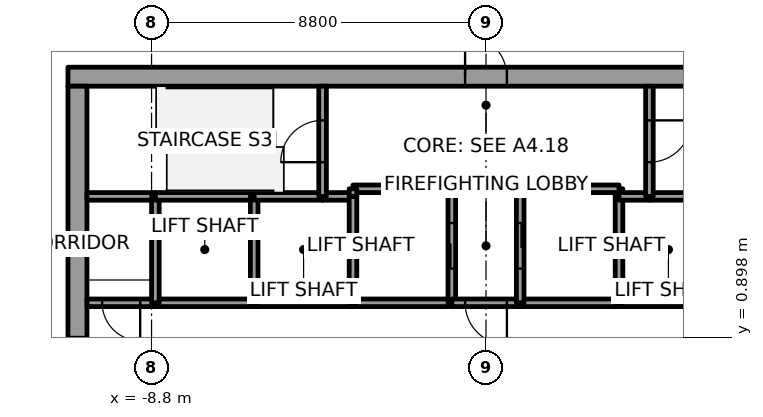
"""IFC4 building model, lengths in metres.
Left out: names, types, materials, properties, quantities, classifications, styles, units other than length and angle.
Written with IfcOpenShell. Run it as: python <this file> out.ifc"""

import sys

from ifc_helpers import new_model, si_unit, direction, frame, frame_2d, origin, place, context, subcontext, project, spatial, rectangle, extrude, element, fill, save


model = new_model("IFC4")
c1 = context("Model", 3, precision=1e-05, world=origin(), true_north=direction((0.0, 1.0)))
c2 = subcontext(c1, "Body", "Model", "MODEL_VIEW")
j1 = project(units=[si_unit("LENGTHUNIT", "METRE"), si_unit("PLANEANGLEUNIT", "RADIAN")], contexts=[c1])
p1 = place(None, origin())
s1 = spatial("IfcSite", under=j1, at=p1, CompositionType="ELEMENT")
p2 = place(p1, origin())
s2 = spatial("IfcBuilding", under=s1, at=p2, CompositionType="ELEMENT")
p3 = place(p2, frame((0.0, 0.0, 81.3)))
s3 = spatial("IfcBuildingStorey", under=s2, at=p3, CompositionType="ELEMENT", Elevation=81.3)
p4 = place(p3, frame((-11.0, 7.75, 0.0), z_axis=(0.0, 0.0, 1.0), x_axis=(1.0, 0.0, 0.0)))
e1 = element("IfcWall", 1, at=p4, inside=s3, PredefinedType="SHEAR", context=c2, shape_type="SweptSolid", body=[
    extrude(rectangle(XDim=22.0, YDim=0.5, at=frame_2d((11.0, 0.0))), origin(), (0.0, 0.0, 1.0), 3.7),
])
p5 = place(p4, frame((10.45, 0.0, 0.0)))
e2 = element("IfcOpeningElement", 2, at=p5, cuts=e1, PredefinedType="OPENING", context=c2, shape_type="SweptSolid", body=[
    extrude(rectangle(XDim=1.1, YDim=2.1, at=frame_2d((0.55, 1.05))), frame((0.0, 0.25, 0.0), z_axis=(0.0, -1.0, 0.0), x_axis=(1.0, 0.0, 0.0)), (0.0, 0.0, 1.0), 0.5),
])
p6 = place(p3, frame((-10.75, -7.5, 0.0), z_axis=(0.0, 0.0, 1.0), x_axis=(0.0, 1.0, 0.0)))
e3 = element("IfcWall", 3, at=p6, inside=s3, PredefinedType="SHEAR", context=c2, shape_type="SweptSolid", body=[
    extrude(rectangle(XDim=15.0, YDim=0.5, at=frame_2d((7.5, 0.0))), origin(), (0.0, 0.0, 1.0), 3.7),
])
p7 = place(p6, frame((6.6, 0.0, 0.0)))
e4 = element("IfcOpeningElement", 4, at=p7, cuts=e3, PredefinedType="OPENING", context=c2, shape_type="SweptSolid", body=[
    extrude(rectangle(XDim=1.8, YDim=2.1, at=frame_2d((0.9, 1.05))), frame((0.0, 0.25, 0.0), z_axis=(0.0, -1.0, 0.0), x_axis=(1.0, 0.0, 0.0)), (0.0, 0.0, 1.0), 0.5),
])
p8 = place(p3, frame((-8.7, 1.8, 0.0), z_axis=(0.0, 0.0, 1.0), x_axis=(-1.0, 0.0, 0.0)))
e5 = element("IfcWall", 5, at=p8, inside=s3, PredefinedType="SOLIDWALL", context=c2, shape_type="SweptSolid", body=[
    extrude(rectangle(XDim=1.8, YDim=0.2, at=frame_2d((0.9, 0.0))), origin(), (0.0, 0.0, 1.0), 3.55),
])
p9 = place(p8, frame((0.4, 0.0, 0.0)))
e6 = element("IfcOpeningElement", 6, at=p9, cuts=e5, PredefinedType="OPENING", context=c2, shape_type="SweptSolid", body=[
    extrude(rectangle(XDim=1.0, YDim=2.1, at=frame_2d((0.5, 1.05))), frame((0.0, 0.1, 0.0), z_axis=(0.0, -1.0, 0.0), x_axis=(1.0, 0.0, 0.0)), (0.0, 0.0, 1.0), 0.2),
])
p10 = place(p3, frame((-8.7, 4.6, 0.0), z_axis=(0.0, 0.0, 1.0), x_axis=(-1.0, 0.0, 0.0)))
e7 = element("IfcWall", 7, at=p10, inside=s3, PredefinedType="SOLIDWALL", context=c2, shape_type="SweptSolid", body=[
    extrude(rectangle(XDim=1.8, YDim=0.2, at=frame_2d((0.9, 0.0))), origin(), (0.0, 0.0, 1.0), 3.55),
])
p11 = place(p3, frame((-6.1, 1.8, 0.0), z_axis=(0.0, 0.0, 1.0), x_axis=(-1.0, 0.0, 0.0)))
e8 = element("IfcWall", 8, at=p11, inside=s3, PredefinedType="SOLIDWALL", context=c2, shape_type="SweptSolid", body=[
    extrude(rectangle(XDim=2.6, YDim=0.2, at=frame_2d((1.3, 0.0))), origin(), (0.0, 0.0, 1.0), 3.55),
])
p12 = place(p3, frame((-8.7, 1.8, 0.0), z_axis=(0.0, 0.0, 1.0), x_axis=(0.0, 1.0, 0.0)))
e9 = element("IfcWall", 9, at=p12, inside=s3, PredefinedType="SOLIDWALL", context=c2, shape_type="SweptSolid", body=[
    extrude(rectangle(XDim=2.8, YDim=0.2, at=frame_2d((1.4, 0.0))), origin(), (0.0, 0.0, 1.0), 3.55),
])
p13 = place(p3, frame((-6.1, 4.6, 0.0), z_axis=(0.0, 0.0, 1.0), x_axis=(-1.0, 0.0, 0.0)))
e10 = element("IfcWall", 10, at=p13, inside=s3, PredefinedType="SOLIDWALL", context=c2, shape_type="SweptSolid", body=[
    extrude(rectangle(XDim=2.6, YDim=0.2, at=frame_2d((1.3, 0.0))), origin(), (0.0, 0.0, 1.0), 3.55),
])
p14 = place(p3, frame((-3.5, 1.8, 0.0), z_axis=(0.0, 0.0, 1.0), x_axis=(-1.0, 0.0, 0.0)))
e11 = element("IfcWall", 11, at=p14, inside=s3, PredefinedType="SOLIDWALL", context=c2, shape_type="SweptSolid", body=[
    extrude(rectangle(XDim=2.6, YDim=0.2, at=frame_2d((1.3, 0.0))), origin(), (0.0, 0.0, 1.0), 3.55),
])
p15 = place(p3, frame((-6.1, 1.8, 0.0), z_axis=(0.0, 0.0, 1.0), x_axis=(0.0, 1.0, 0.0)))
e12 = element("IfcWall", 12, at=p15, inside=s3, PredefinedType="SOLIDWALL", context=c2, shape_type="SweptSolid", body=[
    extrude(rectangle(XDim=2.8, YDim=0.2, at=frame_2d((1.4, 0.0))), origin(), (0.0, 0.0, 1.0), 3.55),
])
p16 = place(p3, frame((-4.3, 4.6, 0.0), z_axis=(0.0, 0.0, 1.0), x_axis=(-1.0, 0.0, 0.0)))
e13 = element("IfcWall", 13, at=p16, inside=s3, PredefinedType="SOLIDWALL", context=c2, shape_type="SweptSolid", body=[
    extrude(rectangle(XDim=1.8, YDim=0.2, at=frame_2d((0.9, 0.0))), origin(), (0.0, 0.0, 1.0), 3.55),
])
p17 = place(p3, frame((-3.5, 4.6, 0.0), z_axis=(0.0, 0.0, 1.0), x_axis=(-1.0, 0.0, 0.0)))
e14 = element("IfcWall", 14, at=p17, inside=s3, PredefinedType="SOLIDWALL", context=c2, shape_type="SweptSolid", body=[
    extrude(rectangle(XDim=0.8, YDim=0.2, at=frame_2d((0.4, 0.0))), origin(), (0.0, 0.0, 1.0), 3.55),
])
p18 = place(p3, frame((-4.3, 4.6, 0.0), z_axis=(0.0, 0.0, 1.0), x_axis=(0.0, 1.0, 0.0)))
e15 = element("IfcWall", 15, at=p18, inside=s3, PredefinedType="SOLIDWALL", context=c2, shape_type="SweptSolid", body=[
    extrude(rectangle(XDim=2.9, YDim=0.2, at=frame_2d((1.45, 0.0))), origin(), (0.0, 0.0, 1.0), 3.55),
])
p19 = place(p18, frame((0.9, 0.0, 0.0)))
e16 = element("IfcOpeningElement", 16, at=p19, cuts=e15, PredefinedType="OPENING", context=c2, shape_type="SweptSolid", body=[
    extrude(rectangle(XDim=1.1, YDim=2.1, at=frame_2d((0.55, 1.05))), frame((0.0, 0.1, 0.0), z_axis=(0.0, -1.0, 0.0), x_axis=(1.0, 0.0, 0.0)), (0.0, 0.0, 1.0), 0.2),
])
p20 = place(p3, frame((-0.9, 1.8, 0.0), z_axis=(0.0, 0.0, 1.0), x_axis=(-1.0, 0.0, 0.0)))
e17 = element("IfcWall", 17, at=p20, inside=s3, PredefinedType="SOLIDWALL", context=c2, shape_type="SweptSolid", body=[
    extrude(rectangle(XDim=2.6, YDim=0.2, at=frame_2d((1.3, 0.0))), origin(), (0.0, 0.0, 1.0), 3.55),
])
p21 = place(p3, frame((-3.5, 4.6, 0.0), z_axis=(0.0, 0.0, 1.0), x_axis=(0.0, -1.0, 0.0)))
e18 = element("IfcWall", 18, at=p21, inside=s3, PredefinedType="SOLIDWALL", context=c2, shape_type="SweptSolid", body=[
    extrude(rectangle(XDim=2.8, YDim=0.2, at=frame_2d((1.4, 0.0))), origin(), (0.0, 0.0, 1.0), 3.55),
])
p22 = place(p3, frame((-0.9, 1.8, 0.0), z_axis=(0.0, 0.0, 1.0), x_axis=(0.0, 1.0, 0.0)))
e19 = element("IfcWall", 19, at=p22, inside=s3, PredefinedType="SOLIDWALL", context=c2, shape_type="SweptSolid", body=[
    extrude(rectangle(XDim=3.0, YDim=0.2, at=frame_2d((1.5, 0.0))), origin(), (0.0, 0.0, 1.0), 3.55),
])
p23 = place(p22, frame((0.9, 0.0, 0.0)))
e20 = element("IfcOpeningElement", 20, at=p23, cuts=e19, PredefinedType="OPENING", context=c2, shape_type="SweptSolid", body=[
    extrude(rectangle(XDim=1.2, YDim=2.1, at=frame_2d((0.6, 1.05))), frame((0.0, 0.1, 0.0), z_axis=(0.0, -1.0, 0.0), x_axis=(1.0, 0.0, 0.0)), (0.0, 0.0, 1.0), 0.2),
])
p24 = place(p3, frame((-0.9, 4.8, 0.0), z_axis=(0.0, 0.0, 1.0), x_axis=(-1.0, 0.0, 0.0)))
e21 = element("IfcWall", 21, at=p24, inside=s3, PredefinedType="SOLIDWALL", context=c2, shape_type="SweptSolid", body=[
    extrude(rectangle(XDim=2.6, YDim=0.2, at=frame_2d((1.3, 0.0))), origin(), (0.0, 0.0, 1.0), 3.55),
])
p25 = place(p3, frame((-3.5, 4.8, 0.0), z_axis=(0.0, 0.0, 1.0), x_axis=(0.0, -1.0, 0.0)))
e22 = element("IfcWall", 22, at=p25, inside=s3, PredefinedType="SOLIDWALL", context=c2, shape_type="SweptSolid", body=[
    extrude(rectangle(XDim=0.2, YDim=0.2, at=frame_2d((0.1, 0.0))), origin(), (0.0, 0.0, 1.0), 3.55),
])
p26 = place(p3, frame((0.9, 1.8, 0.0), z_axis=(0.0, 0.0, 1.0), x_axis=(-1.0, 0.0, 0.0)))
e23 = element("IfcWall", 23, at=p26, inside=s3, PredefinedType="SOLIDWALL", context=c2, shape_type="SweptSolid", body=[
    extrude(rectangle(XDim=1.8, YDim=0.2, at=frame_2d((0.9, 0.0))), origin(), (0.0, 0.0, 1.0), 3.55),
])
p27 = place(p26, frame((0.35, 0.0, 0.0)))
e24 = element("IfcOpeningElement", 24, at=p27, cuts=e23, PredefinedType="OPENING", context=c2, shape_type="SweptSolid", body=[
    extrude(rectangle(XDim=1.1, YDim=2.1, at=frame_2d((0.55, 1.05))), frame((0.0, 0.1, 0.0), z_axis=(0.0, -1.0, 0.0), x_axis=(1.0, 0.0, 0.0)), (0.0, 0.0, 1.0), 0.2),
])
p28 = place(p3, frame((3.5, 1.8, 0.0), z_axis=(0.0, 0.0, 1.0), x_axis=(-1.0, 0.0, 0.0)))
e25 = element("IfcWall", 25, at=p28, inside=s3, PredefinedType="SOLIDWALL", context=c2, shape_type="SweptSolid", body=[
    extrude(rectangle(XDim=2.6, YDim=0.2, at=frame_2d((1.3, 0.0))), origin(), (0.0, 0.0, 1.0), 3.55),
])
p29 = place(p3, frame((3.5, 4.6, 0.0), z_axis=(0.0, 0.0, 1.0), x_axis=(0.0, 1.0, 0.0)))
e26 = element("IfcWall", 26, at=p29, inside=s3, PredefinedType="SOLIDWALL", context=c2, shape_type="SweptSolid", body=[
    extrude(rectangle(XDim=0.2, YDim=0.2, at=frame_2d((0.1, 0.0))), origin(), (0.0, 0.0, 1.0), 3.55),
])
p30 = place(p3, frame((3.5, 4.8, 0.0), z_axis=(0.0, 0.0, 1.0), x_axis=(-1.0, 0.0, 0.0)))
e27 = element("IfcWall", 27, at=p30, inside=s3, PredefinedType="SOLIDWALL", context=c2, shape_type="SweptSolid", body=[
    extrude(rectangle(XDim=2.6, YDim=0.2, at=frame_2d((1.3, 0.0))), origin(), (0.0, 0.0, 1.0), 3.55),
])
p31 = place(p3, frame((0.9, 4.8, 0.0), z_axis=(0.0, 0.0, 1.0), x_axis=(0.0, -1.0, 0.0)))
e28 = element("IfcWall", 28, at=p31, inside=s3, PredefinedType="SOLIDWALL", context=c2, shape_type="SweptSolid", body=[
    extrude(rectangle(XDim=3.0, YDim=0.2, at=frame_2d((1.5, 0.0))), origin(), (0.0, 0.0, 1.0), 3.55),
])
p32 = place(p31, frame((0.9, 0.0, 0.0)))
e29 = element("IfcOpeningElement", 29, at=p32, cuts=e28, PredefinedType="OPENING", context=c2, shape_type="SweptSolid", body=[
    extrude(rectangle(XDim=1.2, YDim=2.1, at=frame_2d((0.6, 1.05))), frame((0.0, 0.1, 0.0), z_axis=(0.0, -1.0, 0.0), x_axis=(1.0, 0.0, 0.0)), (0.0, 0.0, 1.0), 0.2),
])
p33 = place(p3, frame((6.1, 1.8, 0.0), z_axis=(0.0, 0.0, 1.0), x_axis=(-1.0, 0.0, 0.0)))
e30 = element("IfcWall", 30, at=p33, inside=s3, PredefinedType="SOLIDWALL", context=c2, shape_type="SweptSolid", body=[
    extrude(rectangle(XDim=2.6, YDim=0.2, at=frame_2d((1.3, 0.0))), origin(), (0.0, 0.0, 1.0), 3.55),
])
p34 = place(p3, frame((3.5, 1.8, 0.0), z_axis=(0.0, 0.0, 1.0), x_axis=(0.0, 1.0, 0.0)))
e31 = element("IfcWall", 31, at=p34, inside=s3, PredefinedType="SOLIDWALL", context=c2, shape_type="SweptSolid", body=[
    extrude(rectangle(XDim=2.8, YDim=0.2, at=frame_2d((1.4, 0.0))), origin(), (0.0, 0.0, 1.0), 3.55),
])
p35 = place(p3, frame((4.3, 4.6, 0.0), z_axis=(0.0, 0.0, 1.0), x_axis=(-1.0, 0.0, 0.0)))
e32 = element("IfcWall", 32, at=p35, inside=s3, PredefinedType="SOLIDWALL", context=c2, shape_type="SweptSolid", body=[
    extrude(rectangle(XDim=0.8, YDim=0.2, at=frame_2d((0.4, 0.0))), origin(), (0.0, 0.0, 1.0), 3.55),
])
p36 = place(p3, frame((6.1, 4.6, 0.0), z_axis=(0.0, 0.0, 1.0), x_axis=(-1.0, 0.0, 0.0)))
e33 = element("IfcWall", 33, at=p36, inside=s3, PredefinedType="SOLIDWALL", context=c2, shape_type="SweptSolid", body=[
    extrude(rectangle(XDim=1.8, YDim=0.2, at=frame_2d((0.9, 0.0))), origin(), (0.0, 0.0, 1.0), 3.55),
])
p37 = place(p3, frame((4.3, 7.5, 0.0), z_axis=(0.0, 0.0, 1.0), x_axis=(0.0, -1.0, 0.0)))
e34 = element("IfcWall", 34, at=p37, inside=s3, PredefinedType="SOLIDWALL", context=c2, shape_type="SweptSolid", body=[
    extrude(rectangle(XDim=2.9, YDim=0.2, at=frame_2d((1.45, 0.0))), origin(), (0.0, 0.0, 1.0), 3.55),
])
p38 = place(p37, frame((0.9, 0.0, 0.0)))
e35 = element("IfcOpeningElement", 35, at=p38, cuts=e34, PredefinedType="OPENING", context=c2, shape_type="SweptSolid", body=[
    extrude(rectangle(XDim=1.1, YDim=2.1, at=frame_2d((0.55, 1.05))), frame((0.0, 0.1, 0.0), z_axis=(0.0, -1.0, 0.0), x_axis=(1.0, 0.0, 0.0)), (0.0, 0.0, 1.0), 0.2),
])
p39 = place(p23, origin())
e36 = element("IfcDoor", 36, at=p39, inside=s3, OperationType="SLIDING_TO_RIGHT", PredefinedType="DOOR", context=c2, shape_type="SweptSolid", body=[
    extrude(rectangle(XDim=1.2, YDim=2.1, at=frame_2d((0.6, 1.05))), frame((0.0, 0.025, 0.0), z_axis=(0.0, -1.0, 0.0), x_axis=(1.0, 0.0, 0.0)), (0.0, 0.0, 1.0), 0.05),
])
fill(e20, e36)
p40 = place(p32, origin())
e37 = element("IfcDoor", 37, at=p40, inside=s3, OperationType="SLIDING_TO_RIGHT", PredefinedType="DOOR", context=c2, shape_type="SweptSolid", body=[
    extrude(rectangle(XDim=1.2, YDim=2.1, at=frame_2d((0.6, 1.05))), frame((0.0, 0.025, 0.0), z_axis=(0.0, -1.0, 0.0), x_axis=(1.0, 0.0, 0.0)), (0.0, 0.0, 1.0), 0.05),
])
fill(e29, e37)
p41 = place(p27, origin())
e38 = element("IfcDoor", 38, at=p41, inside=s3, OperationType="SINGLE_SWING_RIGHT", PredefinedType="DOOR", context=c2, shape_type="SweptSolid", body=[
    extrude(rectangle(XDim=1.1, YDim=2.1, at=frame_2d((0.55, 1.05))), frame((0.0, 0.025, 0.0), z_axis=(0.0, -1.0, 0.0), x_axis=(1.0, 0.0, 0.0)), (0.0, 0.0, 1.0), 0.05),
])
fill(e24, e38)
p42 = place(p9, origin())
e39 = element("IfcDoor", 39, at=p42, inside=s3, OperationType="SINGLE_SWING_RIGHT", PredefinedType="DOOR", context=c2, shape_type="SweptSolid", body=[
    extrude(rectangle(XDim=1.0, YDim=2.1, at=frame_2d((0.5, 1.05))), frame((0.0, 0.025, 0.0), z_axis=(0.0, -1.0, 0.0), x_axis=(1.0, 0.0, 0.0)), (0.0, 0.0, 1.0), 0.05),
])
fill(e6, e39)
p43 = place(p19, origin())
e40 = element("IfcDoor", 40, at=p43, inside=s3, OperationType="SINGLE_SWING_RIGHT", PredefinedType="DOOR", context=c2, shape_type="SweptSolid", body=[
    extrude(rectangle(XDim=1.1, YDim=2.1, at=frame_2d((0.55, 1.05))), frame((0.0, 0.025, 0.0), z_axis=(0.0, -1.0, 0.0), x_axis=(1.0, 0.0, 0.0)), (0.0, 0.0, 1.0), 0.05),
])
fill(e16, e40)
p44 = place(p38, origin())
e41 = element("IfcDoor", 41, at=p44, inside=s3, OperationType="SINGLE_SWING_LEFT", PredefinedType="DOOR", context=c2, shape_type="SweptSolid", body=[
    extrude(rectangle(XDim=1.1, YDim=2.1, at=frame_2d((0.55, 1.05))), frame((0.0, 0.025, 0.0), z_axis=(0.0, -1.0, 0.0), x_axis=(1.0, 0.0, 0.0)), (0.0, 0.0, 1.0), 0.05),
])
fill(e35, e41)
p45 = place(p7, origin())
e42 = element("IfcDoor", 42, at=p45, inside=s3, OperationType="DOUBLE_DOOR_SINGLE_SWING", PredefinedType="DOOR", context=c2, shape_type="SweptSolid", body=[
    extrude(rectangle(XDim=1.8, YDim=2.1, at=frame_2d((0.9, 1.05))), frame((0.0, 0.025, 0.0), z_axis=(0.0, -1.0, 0.0), x_axis=(1.0, 0.0, 0.0)), (0.0, 0.0, 1.0), 0.05),
])
fill(e4, e42)
p46 = place(p5, origin())
e43 = element("IfcDoor", 43, at=p46, inside=s3, OperationType="SINGLE_SWING_LEFT", PredefinedType="DOOR", context=c2, shape_type="SweptSolid", body=[
    extrude(rectangle(XDim=1.1, YDim=2.1, at=frame_2d((0.55, 1.05))), frame((0.0, 0.025, 0.0), z_axis=(0.0, -1.0, 0.0), x_axis=(1.0, 0.0, 0.0)), (0.0, 0.0, 1.0), 0.05),
])
fill(e2, e43)
save(model, sys.argv[1])
